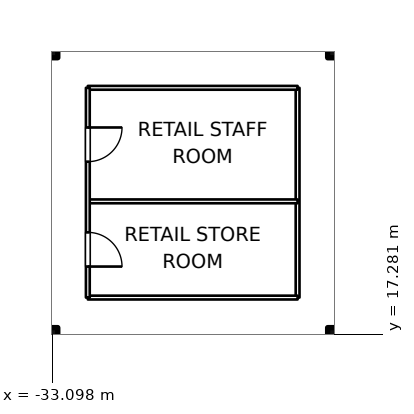
"""IFC4 building model, lengths in metres.
Left out: names, types, materials, properties, quantities, classifications, styles, units other than length and angle.
Written with IfcOpenShell. Run it as: python <this file> out.ifc"""

import sys

from ifc_helpers import new_model, si_unit, direction, frame, frame_2d, origin, origin_2d, place, context, subcontext, project, spatial, rectangle, extrude, element, fill, save


model = new_model("IFC4")
c1 = context("Model", 3, precision=1e-05, world=origin(), true_north=direction((0.0, 1.0)))
c2 = subcontext(c1, "Body", "Model", "MODEL_VIEW")
j1 = project(units=[si_unit("LENGTHUNIT", "METRE"), si_unit("PLANEANGLEUNIT", "RADIAN")], contexts=[c1])
p1 = place(None, origin())
s1 = spatial("IfcSite", under=j1, at=p1, CompositionType="ELEMENT")
p2 = place(p1, origin())
s2 = spatial("IfcBuilding", under=s1, at=p2, CompositionType="ELEMENT")
p3 = place(p2, origin())
s3 = spatial("IfcBuildingStorey", under=s2, at=p3, CompositionType="ELEMENT", Elevation=0.0)
for number, where, z_axis, x_axis in (
    (1, (-33.6, 16.8, 0.0), (0.0, 0.0, 1.0), (1.0, 0.0, 0.0)),
    (2, (-33.6, 25.2, 0.0), (0.0, 0.0, 1.0), (1.0, 0.0, 0.0)),
    (3, (-25.2, 16.8, 0.0), (0.0, 0.0, 1.0), (1.0, 0.0, 0.0)),
    (4, (-25.2, 25.2, 0.0), (0.0, 0.0, 1.0), (1.0, 0.0, 0.0)),
):
    element("IfcColumn", number, at=place(p3, frame(where, z_axis=z_axis, x_axis=x_axis)), inside=s3, PredefinedType="COLUMN", context=c2, shape_type="SweptSolid", body=[
        extrude(rectangle(XDim=1.3, YDim=1.3, at=origin_2d()), origin(), (0.0, 0.0, 1.0), 6.0),
    ])
for number, where, z_axis, x_axis in (
    (5, (-32.16, 18.24, 0.0), (0.0, 0.0, 1.0), (1.0, 0.0, 0.0)),
    (6, (-26.64, 18.24, 0.0), (0.0, 0.0, 1.0), (0.0, 1.0, 0.0)),
    (7, (-26.64, 23.76, 0.0), (0.0, 0.0, 1.0), (-1.0, 0.0, 0.0)),
):
    element("IfcWall", number, at=place(p3, frame(where, z_axis=z_axis, x_axis=x_axis)), inside=s3, PredefinedType="PARTITIONING", context=c2, shape_type="SweptSolid", body=[
        extrude(rectangle(XDim=5.52, YDim=0.1, at=frame_2d((2.76, 0.0))), origin(), (0.0, 0.0, 1.0), 5.7),
    ])
p4 = place(p3, frame((-32.16, 23.76, 0.0), z_axis=(0.0, 0.0, 1.0), x_axis=(0.0, -1.0, 0.0)))
e8 = element("IfcWall", 8, at=p4, inside=s3, PredefinedType="PARTITIONING", context=c2, shape_type="SweptSolid", body=[
    extrude(rectangle(XDim=5.52, YDim=0.1, at=frame_2d((2.76, 0.0))), origin(), (0.0, 0.0, 1.0), 5.7),
])
p5 = place(p4, frame((3.804, 0.0, 0.0)))
e9 = element("IfcOpeningElement", 9, at=p5, cuts=e8, PredefinedType="OPENING", context=c2, shape_type="SweptSolid", body=[
    extrude(rectangle(XDim=0.9, YDim=2.1, at=frame_2d((0.45, 1.05))), frame((0.0, 0.06, 0.0), z_axis=(0.0, -1.0, 0.0), x_axis=(1.0, 0.0, 0.0)), (0.0, 0.0, 1.0), 0.12),
])
p6 = place(p4, frame((1.044, 0.0, 0.0)))
e10 = element("IfcOpeningElement", 10, at=p6, cuts=e8, PredefinedType="OPENING", context=c2, shape_type="SweptSolid", body=[
    extrude(rectangle(XDim=0.9, YDim=2.1, at=frame_2d((0.45, 1.05))), frame((0.0, 0.06, 0.0), z_axis=(0.0, -1.0, 0.0), x_axis=(1.0, 0.0, 0.0)), (0.0, 0.0, 1.0), 0.12),
])
p7 = place(p3, frame((-32.16, 20.772, 0.0), z_axis=(0.0, 0.0, 1.0), x_axis=(1.0, 0.0, 0.0)))
e11 = element("IfcWall", 11, at=p7, inside=s3, PredefinedType="PARTITIONING", context=c2, shape_type="SweptSolid", body=[
    extrude(rectangle(XDim=5.52, YDim=0.1, at=frame_2d((2.76, 0.0))), origin(), (0.0, 0.0, 1.0), 5.7),
])
p8 = place(p5, origin())
e12 = element("IfcDoor", 12, at=p8, inside=s3, OperationType="SINGLE_SWING_RIGHT", PredefinedType="DOOR", context=c2, shape_type="SweptSolid", body=[
    extrude(rectangle(XDim=0.9, YDim=2.1, at=frame_2d((0.45, 1.05))), frame((0.0, 0.025, 0.0), z_axis=(0.0, -1.0, 0.0), x_axis=(1.0, 0.0, 0.0)), (0.0, 0.0, 1.0), 0.05),
])
fill(e9, e12)
p9 = place(p6, origin())
e13 = element("IfcDoor", 13, at=p9, inside=s3, OperationType="SINGLE_SWING_LEFT", PredefinedType="DOOR", context=c2, shape_type="SweptSolid", body=[
    extrude(rectangle(XDim=0.9, YDim=2.1, at=frame_2d((0.45, 1.05))), frame((0.0, 0.025, 0.0), z_axis=(0.0, -1.0, 0.0), x_axis=(1.0, 0.0, 0.0)), (0.0, 0.0, 1.0), 0.05),
])
fill(e10, e13)
save(model, sys.argv[1])
